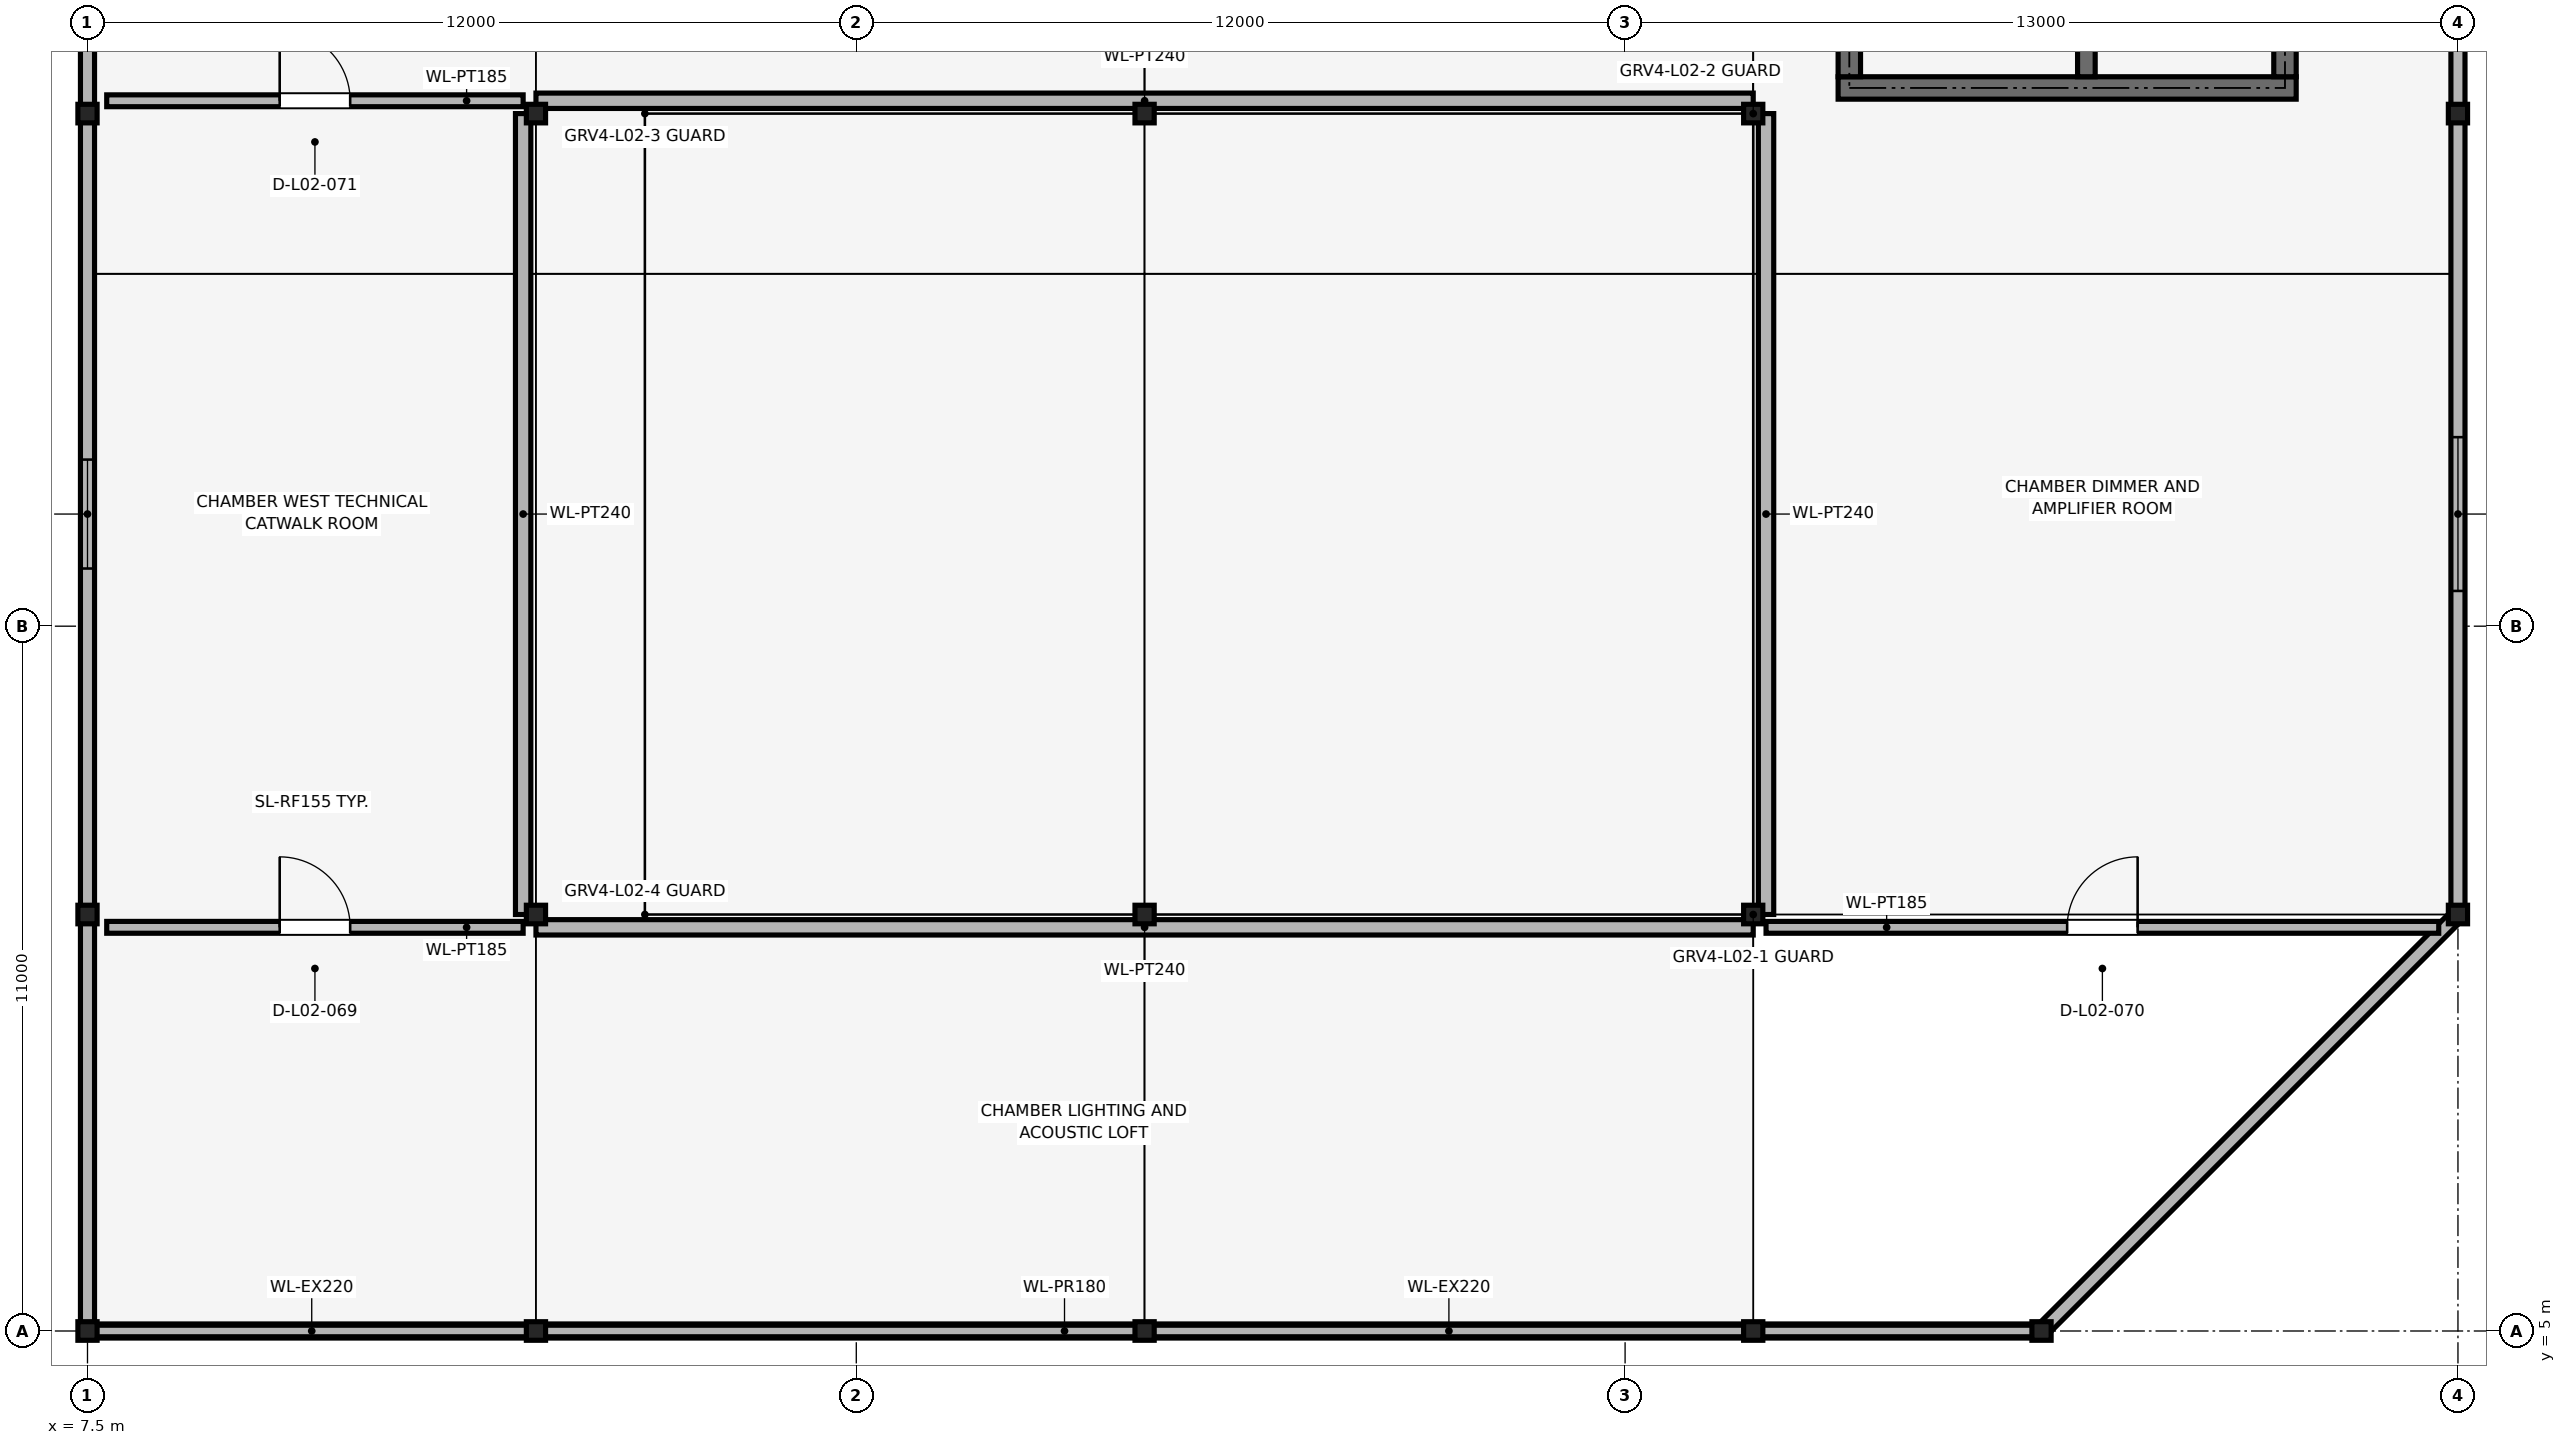
"""IFC4 building model, lengths in metres.
Left out: names, types, materials, properties, quantities, classifications, styles, units other than length and angle.
Written with IfcOpenShell. Run it as: python <this file> out.ifc"""

import sys

from ifc_helpers import new_model, si_unit, direction, frame, frame_2d, origin, origin_2d, place, context, subcontext, project, spatial, rectangle, i_section, extrude, element, fill, save


model = new_model("IFC4")
c1 = context("Model", 3, precision=1e-05, world=origin(), true_north=direction((0.0, 1.0)))
c2 = subcontext(c1, "Body", "Model", "MODEL_VIEW")
j1 = project(units=[si_unit("LENGTHUNIT", "METRE"), si_unit("PLANEANGLEUNIT", "RADIAN")], contexts=[c1])
p1 = place(None, origin())
s1 = spatial("IfcSite", under=j1, at=p1, CompositionType="ELEMENT")
p2 = place(p1, origin())
s2 = spatial("IfcBuilding", under=s1, at=p2, CompositionType="ELEMENT")
p3 = place(p2, frame((0.0, 0.0, 9.6)))
s3 = spatial("IfcBuildingStorey", under=s2, at=p3, CompositionType="ELEMENT", Elevation=9.6)
for number, where, z_axis, x_axis in (
    (1, (7.5, 5.0, 0.0), (0.0, 0.0, 1.0), (1.0, 0.0, 0.0)),
    (2, (14.5, 5.0, 0.0), (0.0, 0.0, 1.0), (1.0, 0.0, 0.0)),
    (3, (24.0, 5.0, 0.0), (0.0, 0.0, 1.0), (1.0, 0.0, 0.0)),
    (4, (33.5, 5.0, 0.0), (0.0, 0.0, 1.0), (1.0, 0.0, 0.0)),
    (5, (38.0, 5.0, 0.0), (0.0, 0.0, 1.0), (1.0, 0.0, 0.0)),
    (6, (44.5, 11.5, 0.0), (0.0, 0.0, 1.0), (1.0, 0.0, 0.0)),
    (7, (44.5, 24.0, 0.0), (0.0, 0.0, 1.0), (1.0, 0.0, 0.0)),
    (8, (7.5, 24.0, 0.0), (0.0, 0.0, 1.0), (1.0, 0.0, 0.0)),
    (9, (7.5, 11.5, 0.0), (0.0, 0.0, 1.0), (1.0, 0.0, 0.0)),
    (10, (14.5, 11.5, 0.0), (0.0, 0.0, 1.0), (1.0, 0.0, 0.0)),
    (11, (24.0, 11.5, 0.0), (0.0, 0.0, 1.0), (1.0, 0.0, 0.0)),
    (12, (33.5, 11.5, 0.0), (0.0, 0.0, 1.0), (1.0, 0.0, 0.0)),
    (13, (14.5, 24.0, 0.0), (0.0, 0.0, 1.0), (1.0, 0.0, 0.0)),
    (14, (24.0, 24.0, 0.0), (0.0, 0.0, 1.0), (1.0, 0.0, 0.0)),
    (15, (33.5, 24.0, 0.0), (0.0, 0.0, 1.0), (1.0, 0.0, 0.0)),
):
    element("IfcColumn", number, at=place(p3, frame(where, z_axis=z_axis, x_axis=x_axis)), inside=s3, PredefinedType="COLUMN", context=c2, shape_type="SweptSolid", body=[
        extrude(i_section(OverallWidth=0.3, OverallDepth=0.29, WebThickness=0.009, FlangeThickness=0.014, FilletRadius=0.027, at=origin_2d()), origin(), (0.0, 0.0, 1.0), 4.8),
    ])
p4 = place(p3, frame((14.48, 5.0, 0.0), z_axis=(0.0, 0.0, 1.0), x_axis=(-1.0, 0.0, 0.0)))
e16 = element("IfcWall", 16, at=p4, inside=s3, PredefinedType="SOLIDWALL", context=c2, shape_type="SweptSolid", body=[
    extrude(rectangle(XDim=6.96, YDim=0.22, at=frame_2d((3.48, 0.0))), origin(), (0.0, 0.0, 1.0), 3.848),
])
for number, where, z_axis, x_axis in (
    (17, (23.98, 5.0, 0.0), (0.0, 0.0, 1.0), (-1.0, 0.0, 0.0)),
    (18, (33.48, 5.0, 0.0), (0.0, 0.0, 1.0), (-1.0, 0.0, 0.0)),
):
    element("IfcWall", number, at=place(p3, frame(where, z_axis=z_axis, x_axis=x_axis)), inside=s3, PredefinedType="SOLIDWALL", context=c2, shape_type="SweptSolid", body=[
        extrude(rectangle(XDim=9.46, YDim=0.22, at=frame_2d((4.73, 0.0))), origin(), (0.0, 0.0, 1.0), 3.848),
    ])
p5 = place(p3, frame((37.98, 5.0, 0.0), z_axis=(0.0, 0.0, 1.0), x_axis=(-1.0, 0.0, 0.0)))
e19 = element("IfcWall", 19, at=p5, inside=s3, PredefinedType="SOLIDWALL", context=c2, shape_type="SweptSolid", body=[
    extrude(rectangle(XDim=4.46, YDim=0.22, at=frame_2d((2.23, 0.0))), origin(), (0.0, 0.0, 1.0), 3.848),
])
p6 = place(p3, frame((44.486, 11.486, 0.0), z_axis=(0.0, 0.0, 1.0), x_axis=(-0.707106781187, -0.707106781187, 0.0)))
e20 = element("IfcWall", 20, at=p6, inside=s3, PredefinedType="SOLIDWALL", context=c2, shape_type="SweptSolid", body=[
    extrude(rectangle(XDim=9.152, YDim=0.22, at=frame_2d((4.576, 0.0))), origin(), (0.0, 0.0, 1.0), 3.848),
])
p7 = place(p3, frame((44.5, 23.98, 0.0), z_axis=(0.0, 0.0, 1.0), x_axis=(0.0, -1.0, 0.0)))
e21 = element("IfcWall", 21, at=p7, inside=s3, PredefinedType="SOLIDWALL", context=c2, shape_type="SweptSolid", body=[
    extrude(rectangle(XDim=12.46, YDim=0.22, at=frame_2d((6.23, 0.0))), origin(), (0.0, 0.0, 1.0), 3.848),
])
p8 = place(p7, frame((5.03, 0.0, 1.05)))
e22 = element("IfcOpeningElement", 22, at=p8, cuts=e21, PredefinedType="OPENING", context=c2, shape_type="SweptSolid", body=[
    extrude(rectangle(XDim=2.4, YDim=1.35, at=frame_2d((1.2, 0.675))), frame((0.0, 0.12, 0.0), z_axis=(0.0, -1.0, 0.0), x_axis=(1.0, 0.0, 0.0)), (0.0, 0.0, 1.0), 0.24),
])
p9 = place(p3, frame((44.5, 29.98, 0.0), z_axis=(0.0, 0.0, 1.0), x_axis=(0.0, -1.0, 0.0)))
e23 = element("IfcWall", 23, at=p9, inside=s3, PredefinedType="SOLIDWALL", context=c2, shape_type="SweptSolid", body=[
    extrude(rectangle(XDim=5.96, YDim=0.22, at=frame_2d((2.98, 0.0))), origin(), (0.0, 0.0, 1.0), 3.848),
])
p10 = place(p3, frame((7.5, 24.02, 0.0), z_axis=(0.0, 0.0, 1.0), x_axis=(0.0, 1.0, 0.0)))
e24 = element("IfcWall", 24, at=p10, inside=s3, PredefinedType="SOLIDWALL", context=c2, shape_type="SweptSolid", body=[
    extrude(rectangle(XDim=13.96, YDim=0.22, at=frame_2d((6.98, 0.0))), origin(), (0.0, 0.0, 1.0), 3.848),
])
p11 = place(p3, frame((7.5, 11.52, 0.0), z_axis=(0.0, 0.0, 1.0), x_axis=(0.0, 1.0, 0.0)))
e25 = element("IfcWall", 25, at=p11, inside=s3, PredefinedType="SOLIDWALL", context=c2, shape_type="SweptSolid", body=[
    extrude(rectangle(XDim=12.46, YDim=0.22, at=frame_2d((6.23, 0.0))), origin(), (0.0, 0.0, 1.0), 3.848),
])
p12 = place(p11, frame((5.38, 0.0, 1.6)))
e26 = element("IfcOpeningElement", 26, at=p12, cuts=e25, PredefinedType="OPENING", context=c2, shape_type="SweptSolid", body=[
    extrude(rectangle(XDim=1.7, YDim=0.95, at=frame_2d((0.85, 0.475))), frame((0.0, 0.12, 0.0), z_axis=(0.0, -1.0, 0.0), x_axis=(1.0, 0.0, 0.0)), (0.0, 0.0, 1.0), 0.24),
])
p13 = place(p3, frame((7.5, 5.02, 0.0), z_axis=(0.0, 0.0, 1.0), x_axis=(0.0, 1.0, 0.0)))
e27 = element("IfcWall", 27, at=p13, inside=s3, PredefinedType="SOLIDWALL", context=c2, shape_type="SweptSolid", body=[
    extrude(rectangle(XDim=6.46, YDim=0.22, at=frame_2d((3.23, 0.0))), origin(), (0.0, 0.0, 1.0), 3.848),
])
p14 = place(p3, frame((7.6, 5.0, 4.8), z_axis=(0.0, 0.0, 1.0), x_axis=(1.0, 0.0, 0.0)))
e28 = element("IfcWall", 28, at=p14, inside=s3, PredefinedType="PARAPET", context=c2, shape_type="SweptSolid", body=[
    extrude(rectangle(XDim=30.3, YDim=0.18, at=frame_2d((15.15, 0.0))), origin(), (0.0, 0.0, 1.0), 0.65),
])
p15 = place(p3, frame((34.825, 24.4, 0.0), z_axis=(0.0, 0.0, 1.0), x_axis=(1.0, 0.0, 0.0)))
e29 = element("IfcWall", 29, at=p15, inside=s3, PredefinedType="SHEAR", context=c2, shape_type="SweptSolid", body=[
    extrude(rectangle(XDim=7.15, YDim=0.35, at=frame_2d((3.575, 0.0))), origin(), (0.0, 0.0, 1.0), 4.55),
])
for number, where, z_axis, x_axis in (
    (30, (35.0, 24.575, 0.0), (0.0, 0.0, 1.0), (0.0, 1.0, 0.0)),
    (31, (41.8, 24.575, 0.0), (0.0, 0.0, 1.0), (0.0, 1.0, 0.0)),
):
    element("IfcWall", number, at=place(p3, frame(where, z_axis=z_axis, x_axis=x_axis)), inside=s3, PredefinedType="SHEAR", context=c2, shape_type="SweptSolid", body=[
        extrude(rectangle(XDim=11.2, YDim=0.35, at=frame_2d((5.6, 0.0))), origin(), (0.0, 0.0, 1.0), 4.55),
    ])
p16 = place(p3, frame((38.7, 24.575, 0.0), z_axis=(0.0, 0.0, 1.0), x_axis=(0.0, 1.0, 0.0)))
e32 = element("IfcWall", 32, at=p16, inside=s3, PredefinedType="SHEAR", context=c2, shape_type="SweptSolid", body=[
    extrude(rectangle(XDim=6.637, YDim=0.275, at=frame_2d((3.319, 0.0))), origin(), (0.0, 0.0, 1.0), 4.55),
])
p17 = place(p3, frame((7.8, 11.3, 0.0), z_axis=(0.0, 0.0, 1.0), x_axis=(1.0, 0.0, 0.0)))
e33 = element("IfcWall", 33, at=p17, inside=s3, PredefinedType="PARTITIONING", context=c2, shape_type="SweptSolid", body=[
    extrude(rectangle(XDim=6.5, YDim=0.185, at=frame_2d((3.25, 0.0))), origin(), (0.0, 0.0, 1.0), 3.85),
])
p18 = place(p17, frame((2.7, 0.0, 0.0)))
e34 = element("IfcOpeningElement", 34, at=p18, cuts=e33, PredefinedType="OPENING", context=c2, shape_type="SweptSolid", body=[
    extrude(rectangle(XDim=1.1, YDim=2.15, at=frame_2d((0.55, 1.075))), frame((0.0, 0.103, 0.0), z_axis=(0.0, -1.0, 0.0), x_axis=(1.0, 0.0, 0.0)), (0.0, 0.0, 1.0), 0.205),
])
p19 = place(p3, frame((14.5, 11.3, 0.0), z_axis=(0.0, 0.0, 1.0), x_axis=(1.0, 0.0, 0.0)))
e35 = element("IfcWall", 35, at=p19, inside=s3, PredefinedType="PARTITIONING", context=c2, shape_type="SweptSolid", body=[
    extrude(rectangle(XDim=19.0, YDim=0.24, at=frame_2d((9.5, 0.0))), origin(), (0.0, 0.0, 1.0), 3.85),
])
p20 = place(p3, frame((33.7, 11.3, 0.0), z_axis=(0.0, 0.0, 1.0), x_axis=(1.0, 0.0, 0.0)))
e36 = element("IfcWall", 36, at=p20, inside=s3, PredefinedType="PARTITIONING", context=c2, shape_type="SweptSolid", body=[
    extrude(rectangle(XDim=10.5, YDim=0.185, at=frame_2d((5.25, 0.0))), origin(), (0.0, 0.0, 1.0), 3.85),
])
p21 = place(p20, frame((4.7, 0.0, 0.0)))
e37 = element("IfcOpeningElement", 37, at=p21, cuts=e36, PredefinedType="OPENING", context=c2, shape_type="SweptSolid", body=[
    extrude(rectangle(XDim=1.1, YDim=2.15, at=frame_2d((0.55, 1.075))), frame((0.0, 0.103, 0.0), z_axis=(0.0, -1.0, 0.0), x_axis=(1.0, 0.0, 0.0)), (0.0, 0.0, 1.0), 0.205),
])
for number, where, z_axis, x_axis in (
    (38, (14.3, 11.5, 0.0), (0.0, 0.0, 1.0), (0.0, 1.0, 0.0)),
    (39, (33.7, 11.5, 0.0), (0.0, 0.0, 1.0), (0.0, 1.0, 0.0)),
):
    element("IfcWall", number, at=place(p3, frame(where, z_axis=z_axis, x_axis=x_axis)), inside=s3, PredefinedType="PARTITIONING", context=c2, shape_type="SweptSolid", body=[
        extrude(rectangle(XDim=12.5, YDim=0.24, at=frame_2d((6.25, 0.0))), origin(), (0.0, 0.0, 1.0), 3.85),
    ])
p22 = place(p3, frame((7.8, 24.2, 0.0), z_axis=(0.0, 0.0, 1.0), x_axis=(1.0, 0.0, 0.0)))
e40 = element("IfcWall", 40, at=p22, inside=s3, PredefinedType="PARTITIONING", context=c2, shape_type="SweptSolid", body=[
    extrude(rectangle(XDim=6.5, YDim=0.185, at=frame_2d((3.25, 0.0))), origin(), (0.0, 0.0, 1.0), 3.85),
])
p23 = place(p22, frame((2.7, 0.0, 0.0)))
e41 = element("IfcOpeningElement", 41, at=p23, cuts=e40, PredefinedType="OPENING", context=c2, shape_type="SweptSolid", body=[
    extrude(rectangle(XDim=1.1, YDim=2.15, at=frame_2d((0.55, 1.075))), frame((0.0, 0.103, 0.0), z_axis=(0.0, -1.0, 0.0), x_axis=(1.0, 0.0, 0.0)), (0.0, 0.0, 1.0), 0.205),
])
p24 = place(p3, frame((14.5, 24.2, 0.0), z_axis=(0.0, 0.0, 1.0), x_axis=(1.0, 0.0, 0.0)))
e42 = element("IfcWall", 42, at=p24, inside=s3, PredefinedType="PARTITIONING", context=c2, shape_type="SweptSolid", body=[
    extrude(rectangle(XDim=19.0, YDim=0.24, at=frame_2d((9.5, 0.0))), origin(), (0.0, 0.0, 1.0), 3.85),
])
p25 = place(p8, origin())
e43 = element("IfcWindow", 43, at=p25, inside=s3, PartitioningType="SINGLE_PANEL", PredefinedType="WINDOW", context=c2, shape_type="SweptSolid", body=[
    extrude(rectangle(XDim=2.4, YDim=1.35, at=frame_2d((1.2, 0.675))), frame((0.0, 0.03, 0.0), z_axis=(0.0, -1.0, 0.0), x_axis=(1.0, 0.0, 0.0)), (0.0, 0.0, 1.0), 0.06),
])
fill(e22, e43)
p26 = place(p12, origin())
e44 = element("IfcWindow", 44, at=p26, inside=s3, PartitioningType="SINGLE_PANEL", PredefinedType="WINDOW", context=c2, shape_type="SweptSolid", body=[
    extrude(rectangle(XDim=1.7, YDim=0.95, at=frame_2d((0.85, 0.475))), frame((0.0, 0.03, 0.0), z_axis=(0.0, -1.0, 0.0), x_axis=(1.0, 0.0, 0.0)), (0.0, 0.0, 1.0), 0.06),
])
fill(e26, e44)
p27 = place(p18, origin())
e45 = element("IfcDoor", 45, at=p27, inside=s3, OperationType="SINGLE_SWING_LEFT", PredefinedType="DOOR", context=c2, shape_type="SweptSolid", body=[
    extrude(rectangle(XDim=1.1, YDim=2.15, at=frame_2d((0.55, 1.075))), frame((0.0, 0.025, 0.0), z_axis=(0.0, -1.0, 0.0), x_axis=(1.0, 0.0, 0.0)), (0.0, 0.0, 1.0), 0.05),
])
fill(e34, e45)
p28 = place(p21, origin())
e46 = element("IfcDoor", 46, at=p28, inside=s3, OperationType="SINGLE_SWING_RIGHT", PredefinedType="DOOR", context=c2, shape_type="SweptSolid", body=[
    extrude(rectangle(XDim=1.1, YDim=2.15, at=frame_2d((0.55, 1.075))), frame((0.0, 0.025, 0.0), z_axis=(0.0, -1.0, 0.0), x_axis=(1.0, 0.0, 0.0)), (0.0, 0.0, 1.0), 0.05),
])
fill(e37, e46)
p29 = place(p23, origin())
e47 = element("IfcDoor", 47, at=p29, inside=s3, OperationType="SINGLE_SWING_LEFT", PredefinedType="DOOR", context=c2, shape_type="SweptSolid", body=[
    extrude(rectangle(XDim=1.1, YDim=2.15, at=frame_2d((0.55, 1.075))), frame((0.0, 0.025, 0.0), z_axis=(0.0, -1.0, 0.0), x_axis=(1.0, 0.0, 0.0)), (0.0, 0.0, 1.0), 0.05),
])
fill(e41, e47)
save(model, sys.argv[1])
